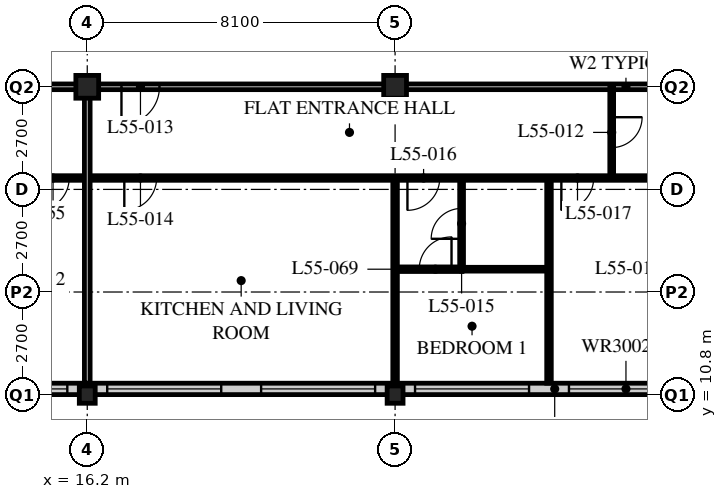
"""IFC4 building model, lengths in metres.
Left out: names, types, materials, properties, quantities, classifications, styles, units other than length and angle.
Written with IfcOpenShell. Run it as: python <this file> out.ifc"""

import sys

from ifc_helpers import new_model, si_unit, direction, frame, frame_2d, origin, origin_2d, place, context, subcontext, project, spatial, rectangle, hollow_rectangle, i_section, extrude, element, fill, save


model = new_model("IFC4")
c1 = context("Model", 3, precision=1e-05, world=origin(), true_north=direction((0.0, 1.0)))
c2 = subcontext(c1, "Body", "Model", "MODEL_VIEW")
j1 = project(units=[si_unit("LENGTHUNIT", "METRE"), si_unit("PLANEANGLEUNIT", "RADIAN")], contexts=[c1])
p1 = place(None, origin())
s1 = spatial("IfcSite", under=j1, at=p1, CompositionType="ELEMENT")
p2 = place(p1, origin())
s2 = spatial("IfcBuilding", under=s1, at=p2, CompositionType="ELEMENT")
p3 = place(p2, frame((0.0, 0.0, 213.6)))
s3 = spatial("IfcBuildingStorey", under=s2, at=p3, CompositionType="ELEMENT", Elevation=213.6)
p4 = place(p3, frame((16.2, 10.8, 0.0), z_axis=(0.0, 0.0, 1.0), x_axis=(1.0, 0.0, 0.0)))
e1 = element("IfcColumn", 1, at=p4, inside=s3, PredefinedType="COLUMN", context=c2, shape_type="SweptSolid", body=[
    extrude(i_section(OverallWidth=0.418, OverallDepth=0.456, WebThickness=0.042, FlangeThickness=0.067, FilletRadius=0.015, at=origin_2d()), origin(), (0.0, 0.0, 1.0), 3.6),
])
p5 = place(p3, frame((16.2, 18.9, 0.0), z_axis=(0.0, 0.0, 1.0), x_axis=(1.0, 0.0, 0.0)))
e2 = element("IfcColumn", 2, at=p5, inside=s3, PredefinedType="COLUMN", context=c2, shape_type="SweptSolid", body=[
    extrude(hollow_rectangle(XDim=0.6, YDim=0.6, WallThickness=0.05, at=origin_2d()), origin(), (0.0, 0.0, 1.0), 3.6),
])
p6 = place(p3, frame((24.3, 10.8, 0.0), z_axis=(0.0, 0.0, 1.0), x_axis=(1.0, 0.0, 0.0)))
e3 = element("IfcColumn", 3, at=p6, inside=s3, PredefinedType="COLUMN", context=c2, shape_type="SweptSolid", body=[
    extrude(i_section(OverallWidth=0.418, OverallDepth=0.456, WebThickness=0.042, FlangeThickness=0.067, FilletRadius=0.015, at=origin_2d()), origin(), (0.0, 0.0, 1.0), 3.6),
])
p7 = place(p3, frame((24.3, 18.9, 0.0), z_axis=(0.0, 0.0, 1.0), x_axis=(1.0, 0.0, 0.0)))
e4 = element("IfcColumn", 4, at=p7, inside=s3, PredefinedType="COLUMN", context=c2, shape_type="SweptSolid", body=[
    extrude(hollow_rectangle(XDim=0.6, YDim=0.6, WallThickness=0.05, at=origin_2d()), origin(), (0.0, 0.0, 1.0), 3.6),
])
p8 = place(p3, frame((8.4, 10.95, 0.0), z_axis=(0.0, 0.0, 1.0), x_axis=(1.0, 0.0, 0.0)))
e5 = element("IfcWall", 5, at=p8, inside=s3, PredefinedType="SOLIDWALL", context=c2, shape_type="SweptSolid", body=[
    extrude(rectangle(XDim=40.2, YDim=0.3, at=frame_2d((20.1, 0.0))), origin(), (0.0, 0.0, 1.0), 3.39),
])
p9 = place(p8, frame((0.225, 0.0, 0.6)))
e6 = element("IfcOpeningElement", 6, at=p9, cuts=e5, PredefinedType="OPENING", context=c2, shape_type="SweptSolid", body=[
    extrude(rectangle(XDim=3.0, YDim=2.4, at=frame_2d((1.5, 1.2))), frame((0.0, 0.16, 0.0), z_axis=(0.0, -1.0, 0.0), x_axis=(1.0, 0.0, 0.0)), (0.0, 0.0, 1.0), 0.32),
])
p10 = place(p8, frame((4.275, 0.0, 0.6)))
e7 = element("IfcOpeningElement", 7, at=p10, cuts=e5, PredefinedType="OPENING", context=c2, shape_type="SweptSolid", body=[
    extrude(rectangle(XDim=3.0, YDim=2.4, at=frame_2d((1.5, 1.2))), frame((0.0, 0.16, 0.0), z_axis=(0.0, -1.0, 0.0), x_axis=(1.0, 0.0, 0.0)), (0.0, 0.0, 1.0), 0.32),
])
p11 = place(p8, frame((8.325, 0.0, 0.6)))
e8 = element("IfcOpeningElement", 8, at=p11, cuts=e5, PredefinedType="OPENING", context=c2, shape_type="SweptSolid", body=[
    extrude(rectangle(XDim=3.0, YDim=2.4, at=frame_2d((1.5, 1.2))), frame((0.0, 0.16, 0.0), z_axis=(0.0, -1.0, 0.0), x_axis=(1.0, 0.0, 0.0)), (0.0, 0.0, 1.0), 0.32),
])
p12 = place(p8, frame((12.375, 0.0, 0.6)))
e9 = element("IfcOpeningElement", 9, at=p12, cuts=e5, PredefinedType="OPENING", context=c2, shape_type="SweptSolid", body=[
    extrude(rectangle(XDim=3.0, YDim=2.4, at=frame_2d((1.5, 1.2))), frame((0.0, 0.16, 0.0), z_axis=(0.0, -1.0, 0.0), x_axis=(1.0, 0.0, 0.0)), (0.0, 0.0, 1.0), 0.32),
])
p13 = place(p8, frame((16.425, 0.0, 0.6)))
e10 = element("IfcOpeningElement", 10, at=p13, cuts=e5, PredefinedType="OPENING", context=c2, shape_type="SweptSolid", body=[
    extrude(rectangle(XDim=3.0, YDim=2.4, at=frame_2d((1.5, 1.2))), frame((0.0, 0.16, 0.0), z_axis=(0.0, -1.0, 0.0), x_axis=(1.0, 0.0, 0.0)), (0.0, 0.0, 1.0), 0.32),
])
p14 = place(p8, frame((20.475, 0.0, 0.6)))
e11 = element("IfcOpeningElement", 11, at=p14, cuts=e5, PredefinedType="OPENING", context=c2, shape_type="SweptSolid", body=[
    extrude(rectangle(XDim=3.0, YDim=2.4, at=frame_2d((1.5, 1.2))), frame((0.0, 0.16, 0.0), z_axis=(0.0, -1.0, 0.0), x_axis=(1.0, 0.0, 0.0)), (0.0, 0.0, 1.0), 0.32),
])
p15 = place(p8, frame((24.525, 0.0, 0.6)))
e12 = element("IfcOpeningElement", 12, at=p15, cuts=e5, PredefinedType="OPENING", context=c2, shape_type="SweptSolid", body=[
    extrude(rectangle(XDim=3.0, YDim=2.4, at=frame_2d((1.5, 1.2))), frame((0.0, 0.16, 0.0), z_axis=(0.0, -1.0, 0.0), x_axis=(1.0, 0.0, 0.0)), (0.0, 0.0, 1.0), 0.32),
])
p16 = place(p8, frame((28.575, 0.0, 0.6)))
e13 = element("IfcOpeningElement", 13, at=p16, cuts=e5, PredefinedType="OPENING", context=c2, shape_type="SweptSolid", body=[
    extrude(rectangle(XDim=3.0, YDim=2.4, at=frame_2d((1.5, 1.2))), frame((0.0, 0.16, 0.0), z_axis=(0.0, -1.0, 0.0), x_axis=(1.0, 0.0, 0.0)), (0.0, 0.0, 1.0), 0.32),
])
p17 = place(p8, frame((32.625, 0.0, 0.6)))
e14 = element("IfcOpeningElement", 14, at=p17, cuts=e5, PredefinedType="OPENING", context=c2, shape_type="SweptSolid", body=[
    extrude(rectangle(XDim=3.0, YDim=2.4, at=frame_2d((1.5, 1.2))), frame((0.0, 0.16, 0.0), z_axis=(0.0, -1.0, 0.0), x_axis=(1.0, 0.0, 0.0)), (0.0, 0.0, 1.0), 0.32),
])
p18 = place(p8, frame((36.675, 0.0, 0.6)))
e15 = element("IfcOpeningElement", 15, at=p18, cuts=e5, PredefinedType="OPENING", context=c2, shape_type="SweptSolid", body=[
    extrude(rectangle(XDim=3.0, YDim=2.4, at=frame_2d((1.5, 1.2))), frame((0.0, 0.16, 0.0), z_axis=(0.0, -1.0, 0.0), x_axis=(1.0, 0.0, 0.0)), (0.0, 0.0, 1.0), 0.32),
])
p19 = place(p3, frame((12.15, 18.9, 0.0), z_axis=(0.0, 0.0, 1.0), x_axis=(1.0, 0.0, 0.0)))
e16 = element("IfcWall", 16, at=p19, inside=s3, PredefinedType="PARTITIONING", context=c2, shape_type="SweptSolid", body=[
    extrude(rectangle(XDim=36.45, YDim=0.15, at=frame_2d((18.225, 0.0))), origin(), (0.0, 0.0, 1.0), 2.778),
])
p20 = place(p19, frame((4.95, 0.0, 0.0)))
e17 = element("IfcOpeningElement", 17, at=p20, cuts=e16, PredefinedType="OPENING", context=c2, shape_type="SweptSolid", body=[
    extrude(rectangle(XDim=1.0, YDim=2.1, at=frame_2d((0.5, 1.05))), frame((0.0, 0.085, 0.0), z_axis=(0.0, -1.0, 0.0), x_axis=(1.0, 0.0, 0.0)), (0.0, 0.0, 1.0), 0.17),
])
p21 = place(p19, frame((22.6, 0.0, 0.0)))
e18 = element("IfcOpeningElement", 18, at=p21, cuts=e16, PredefinedType="OPENING", context=c2, shape_type="SweptSolid", body=[
    extrude(rectangle(XDim=1.0, YDim=2.1, at=frame_2d((0.5, 1.05))), frame((0.0, 0.085, 0.0), z_axis=(0.0, -1.0, 0.0), x_axis=(1.0, 0.0, 0.0)), (0.0, 0.0, 1.0), 0.17),
])
p22 = place(p19, frame((25.0, 0.0, 0.0)))
e19 = element("IfcOpeningElement", 19, at=p22, cuts=e16, PredefinedType="OPENING", context=c2, shape_type="SweptSolid", body=[
    extrude(rectangle(XDim=1.0, YDim=2.1, at=frame_2d((0.5, 1.05))), frame((0.0, 0.085, 0.0), z_axis=(0.0, -1.0, 0.0), x_axis=(1.0, 0.0, 0.0)), (0.0, 0.0, 1.0), 0.17),
])
p23 = place(p19, frame((30.7, 0.0, 0.0)))
e20 = element("IfcOpeningElement", 20, at=p23, cuts=e16, PredefinedType="OPENING", context=c2, shape_type="SweptSolid", body=[
    extrude(rectangle(XDim=1.0, YDim=2.1, at=frame_2d((0.5, 1.05))), frame((0.0, 0.085, 0.0), z_axis=(0.0, -1.0, 0.0), x_axis=(1.0, 0.0, 0.0)), (0.0, 0.0, 1.0), 0.17),
])
p24 = place(p19, frame((1.525, 0.0, 0.0)))
e21 = element("IfcOpeningElement", 21, at=p24, cuts=e16, PredefinedType="OPENING", context=c2, shape_type="SweptSolid", body=[
    extrude(rectangle(XDim=1.0, YDim=2.1, at=frame_2d((0.5, 1.05))), frame((0.0, 0.085, 0.0), z_axis=(0.0, -1.0, 0.0), x_axis=(1.0, 0.0, 0.0)), (0.0, 0.0, 1.0), 0.17),
])
p25 = place(p19, frame((32.825, 0.0, 0.0)))
e22 = element("IfcOpeningElement", 22, at=p25, cuts=e16, PredefinedType="OPENING", context=c2, shape_type="SweptSolid", body=[
    extrude(rectangle(XDim=1.0, YDim=2.1, at=frame_2d((0.5, 1.05))), frame((0.0, 0.085, 0.0), z_axis=(0.0, -1.0, 0.0), x_axis=(1.0, 0.0, 0.0)), (0.0, 0.0, 1.0), 0.17),
])
p26 = place(p3, frame((30.0, 18.9, 0.0), z_axis=(0.0, 0.0, 1.0), x_axis=(0.0, -1.0, 0.0)))
e23 = element("IfcWall", 23, at=p26, inside=s3, PredefinedType="PARTITIONING", context=c2, shape_type="SweptSolid", body=[
    extrude(rectangle(XDim=2.4, YDim=0.1, at=frame_2d((1.2, 0.0))), origin(), (0.0, 0.0, 1.0), 3.39),
])
p27 = place(p26, frame((0.8, 0.0, 0.0)))
e24 = element("IfcOpeningElement", 24, at=p27, cuts=e23, PredefinedType="OPENING", context=c2, shape_type="SweptSolid", body=[
    extrude(rectangle(XDim=0.8, YDim=2.1, at=frame_2d((0.4, 1.05))), frame((0.0, 0.06, 0.0), z_axis=(0.0, -1.0, 0.0), x_axis=(1.0, 0.0, 0.0)), (0.0, 0.0, 1.0), 0.12),
])
p28 = place(p3, frame((26.05, 16.5, 0.0), z_axis=(0.0, 0.0, 1.0), x_axis=(0.0, -1.0, 0.0)))
e25 = element("IfcWall", 25, at=p28, inside=s3, PredefinedType="PARTITIONING", context=c2, shape_type="SweptSolid", body=[
    extrude(rectangle(XDim=2.4, YDim=0.1, at=frame_2d((1.2, 0.0))), origin(), (0.0, 0.0, 1.0), 3.39),
])
p29 = place(p28, frame((0.8, 0.0, 0.0)))
e26 = element("IfcOpeningElement", 26, at=p29, cuts=e25, PredefinedType="OPENING", context=c2, shape_type="SweptSolid", body=[
    extrude(rectangle(XDim=0.8, YDim=2.1, at=frame_2d((0.4, 1.05))), frame((0.0, 0.06, 0.0), z_axis=(0.0, -1.0, 0.0), x_axis=(1.0, 0.0, 0.0)), (0.0, 0.0, 1.0), 0.12),
])
p30 = place(p3, frame((26.05, 14.1, 0.0), z_axis=(0.0, 0.0, 1.0), x_axis=(1.0, 0.0, 0.0)))
e27 = element("IfcWall", 27, at=p30, inside=s3, PredefinedType="PARTITIONING", context=c2, shape_type="SweptSolid", body=[
    extrude(rectangle(XDim=2.3, YDim=0.1, at=frame_2d((1.15, 0.0))), origin(), (0.0, 0.0, 1.0), 3.39),
])
p31 = place(p3, frame((24.3, 16.5, 0.0), z_axis=(0.0, 0.0, 1.0), x_axis=(0.0, -1.0, 0.0)))
e28 = element("IfcWall", 28, at=p31, inside=s3, PredefinedType="PARTITIONING", context=c2, shape_type="SweptSolid", body=[
    extrude(rectangle(XDim=5.4, YDim=0.12, at=frame_2d((2.7, 0.0))), origin(), (0.0, 0.0, 1.0), 2.778),
])
p32 = place(p3, frame((28.35, 16.5, 0.0), z_axis=(0.0, 0.0, 1.0), x_axis=(0.0, -1.0, 0.0)))
e29 = element("IfcWall", 29, at=p32, inside=s3, PredefinedType="PARTITIONING", context=c2, shape_type="SweptSolid", body=[
    extrude(rectangle(XDim=5.4, YDim=0.12, at=frame_2d((2.7, 0.0))), origin(), (0.0, 0.0, 1.0), 3.39),
])
p33 = place(p3, frame((8.15, 16.5, 0.0), z_axis=(0.0, 0.0, 1.0), x_axis=(1.0, 0.0, 0.0)))
e30 = element("IfcWall", 30, at=p33, inside=s3, PredefinedType="PARTITIONING", context=c2, shape_type="SweptSolid", body=[
    extrude(rectangle(XDim=24.25, YDim=0.12, at=frame_2d((12.125, 0.0))), origin(), (0.0, 0.0, 1.0), 3.39),
])
p34 = place(p33, frame((9.025, 0.0, 0.0)))
e31 = element("IfcOpeningElement", 31, at=p34, cuts=e30, PredefinedType="OPENING", context=c2, shape_type="SweptSolid", body=[
    extrude(rectangle(XDim=0.85, YDim=2.1, at=frame_2d((0.425, 1.05))), frame((0.0, 0.07, 0.0), z_axis=(0.0, -1.0, 0.0), x_axis=(1.0, 0.0, 0.0)), (0.0, 0.0, 1.0), 0.14),
])
p35 = place(p33, frame((16.475, 0.0, 0.0)))
e32 = element("IfcOpeningElement", 32, at=p35, cuts=e30, PredefinedType="OPENING", context=c2, shape_type="SweptSolid", body=[
    extrude(rectangle(XDim=0.85, YDim=2.1, at=frame_2d((0.425, 1.05))), frame((0.0, 0.07, 0.0), z_axis=(0.0, -1.0, 0.0), x_axis=(1.0, 0.0, 0.0)), (0.0, 0.0, 1.0), 0.14),
])
p36 = place(p33, frame((20.525, 0.0, 0.0)))
e33 = element("IfcOpeningElement", 33, at=p36, cuts=e30, PredefinedType="OPENING", context=c2, shape_type="SweptSolid", body=[
    extrude(rectangle(XDim=0.85, YDim=2.1, at=frame_2d((0.425, 1.05))), frame((0.0, 0.07, 0.0), z_axis=(0.0, -1.0, 0.0), x_axis=(1.0, 0.0, 0.0)), (0.0, 0.0, 1.0), 0.14),
])
p37 = place(p33, frame((6.725, 0.0, 0.0)))
e34 = element("IfcOpeningElement", 34, at=p37, cuts=e30, PredefinedType="OPENING", context=c2, shape_type="SweptSolid", body=[
    extrude(rectangle(XDim=0.85, YDim=2.1, at=frame_2d((0.425, 1.05))), frame((0.0, 0.07, 0.0), z_axis=(0.0, -1.0, 0.0), x_axis=(1.0, 0.0, 0.0)), (0.0, 0.0, 1.0), 0.14),
])
p38 = place(p33, frame((2.875, 0.0, 0.0)))
e35 = element("IfcOpeningElement", 35, at=p38, cuts=e30, PredefinedType="OPENING", context=c2, shape_type="SweptSolid", body=[
    extrude(rectangle(XDim=0.85, YDim=2.1, at=frame_2d((0.425, 1.05))), frame((0.0, 0.07, 0.0), z_axis=(0.0, -1.0, 0.0), x_axis=(1.0, 0.0, 0.0)), (0.0, 0.0, 1.0), 0.14),
])
p39 = place(p3, frame((16.2, 18.9, 0.0), z_axis=(0.0, 0.0, 1.0), x_axis=(0.0, -1.0, 0.0)))
e36 = element("IfcWall", 36, at=p39, inside=s3, PredefinedType="PARTITIONING", context=c2, shape_type="SweptSolid", body=[
    extrude(rectangle(XDim=7.8, YDim=0.15, at=frame_2d((3.9, 0.0))), origin(), (0.0, 0.0, 1.0), 2.778),
])
p40 = place(p3, frame((26.06, 14.1, 0.0), z_axis=(0.0, 0.0, 1.0), x_axis=(-1.0, 0.0, 0.0)))
e37 = element("IfcWall", 37, at=p40, inside=s3, PredefinedType="PARTITIONING", context=c2, shape_type="SweptSolid", body=[
    extrude(rectangle(XDim=1.76, YDim=0.12, at=frame_2d((0.88, 0.0))), origin(), (0.0, 0.0, 1.0), 3.39),
])
p41 = place(p40, frame((0.275, 0.0, 0.0)))
e38 = element("IfcOpeningElement", 38, at=p41, cuts=e37, PredefinedType="OPENING", context=c2, shape_type="SweptSolid", body=[
    extrude(rectangle(XDim=0.85, YDim=2.1, at=frame_2d((0.425, 1.05))), frame((0.0, 0.07, 0.0), z_axis=(0.0, -1.0, 0.0), x_axis=(1.0, 0.0, 0.0)), (0.0, 0.0, 1.0), 0.14),
])
p42 = place(p10, origin())
e39 = element("IfcWindow", 39, at=p42, inside=s3, PartitioningType="SINGLE_PANEL", PredefinedType="WINDOW", context=c2, shape_type="SweptSolid", body=[
    extrude(rectangle(XDim=3.0, YDim=2.4, at=frame_2d((1.5, 1.2))), frame((0.0, 0.03, 0.0), z_axis=(0.0, -1.0, 0.0), x_axis=(1.0, 0.0, 0.0)), (0.0, 0.0, 1.0), 0.06),
])
fill(e7, e39)
p43 = place(p11, origin())
e40 = element("IfcWindow", 40, at=p43, inside=s3, PartitioningType="SINGLE_PANEL", PredefinedType="WINDOW", context=c2, shape_type="SweptSolid", body=[
    extrude(rectangle(XDim=3.0, YDim=2.4, at=frame_2d((1.5, 1.2))), frame((0.0, 0.03, 0.0), z_axis=(0.0, -1.0, 0.0), x_axis=(1.0, 0.0, 0.0)), (0.0, 0.0, 1.0), 0.06),
])
fill(e8, e40)
p44 = place(p12, origin())
e41 = element("IfcWindow", 41, at=p44, inside=s3, PartitioningType="SINGLE_PANEL", PredefinedType="WINDOW", context=c2, shape_type="SweptSolid", body=[
    extrude(rectangle(XDim=3.0, YDim=2.4, at=frame_2d((1.5, 1.2))), frame((0.0, 0.03, 0.0), z_axis=(0.0, -1.0, 0.0), x_axis=(1.0, 0.0, 0.0)), (0.0, 0.0, 1.0), 0.06),
])
fill(e9, e41)
p45 = place(p13, origin())
e42 = element("IfcWindow", 42, at=p45, inside=s3, PartitioningType="SINGLE_PANEL", PredefinedType="WINDOW", context=c2, shape_type="SweptSolid", body=[
    extrude(rectangle(XDim=3.0, YDim=2.4, at=frame_2d((1.5, 1.2))), frame((0.0, 0.03, 0.0), z_axis=(0.0, -1.0, 0.0), x_axis=(1.0, 0.0, 0.0)), (0.0, 0.0, 1.0), 0.06),
])
fill(e10, e42)
p46 = place(p14, origin())
e43 = element("IfcWindow", 43, at=p46, inside=s3, PartitioningType="SINGLE_PANEL", PredefinedType="WINDOW", context=c2, shape_type="SweptSolid", body=[
    extrude(rectangle(XDim=3.0, YDim=2.4, at=frame_2d((1.5, 1.2))), frame((0.0, 0.03, 0.0), z_axis=(0.0, -1.0, 0.0), x_axis=(1.0, 0.0, 0.0)), (0.0, 0.0, 1.0), 0.06),
])
fill(e11, e43)
p47 = place(p27, origin())
e44 = element("IfcDoor", 44, at=p47, inside=s3, OperationType="SINGLE_SWING_LEFT", PredefinedType="DOOR", context=c2, shape_type="SweptSolid", body=[
    extrude(rectangle(XDim=0.8, YDim=2.1, at=frame_2d((0.4, 1.05))), frame((0.0, 0.025, 0.0), z_axis=(0.0, -1.0, 0.0), x_axis=(1.0, 0.0, 0.0)), (0.0, 0.0, 1.0), 0.05),
])
fill(e24, e44)
p48 = place(p20, origin())
e45 = element("IfcDoor", 45, at=p48, inside=s3, OperationType="SINGLE_SWING_RIGHT", PredefinedType="DOOR", context=c2, shape_type="SweptSolid", body=[
    extrude(rectangle(XDim=1.0, YDim=2.1, at=frame_2d((0.5, 1.05))), frame((0.0, 0.025, 0.0), z_axis=(0.0, -1.0, 0.0), x_axis=(1.0, 0.0, 0.0)), (0.0, 0.0, 1.0), 0.05),
])
fill(e17, e45)
p49 = place(p34, origin())
e46 = element("IfcDoor", 46, at=p49, inside=s3, OperationType="SINGLE_SWING_RIGHT", PredefinedType="DOOR", context=c2, shape_type="SweptSolid", body=[
    extrude(rectangle(XDim=0.85, YDim=2.1, at=frame_2d((0.425, 1.05))), frame((0.0, 0.025, 0.0), z_axis=(0.0, -1.0, 0.0), x_axis=(1.0, 0.0, 0.0)), (0.0, 0.0, 1.0), 0.05),
])
fill(e31, e46)
p50 = place(p29, origin())
e47 = element("IfcDoor", 47, at=p50, inside=s3, OperationType="SINGLE_SWING_LEFT", PredefinedType="DOOR", context=c2, shape_type="SweptSolid", body=[
    extrude(rectangle(XDim=0.8, YDim=2.1, at=frame_2d((0.4, 1.05))), frame((0.0, 0.025, 0.0), z_axis=(0.0, -1.0, 0.0), x_axis=(1.0, 0.0, 0.0)), (0.0, 0.0, 1.0), 0.05),
])
fill(e26, e47)
p51 = place(p35, origin())
e48 = element("IfcDoor", 48, at=p51, inside=s3, OperationType="SINGLE_SWING_RIGHT", PredefinedType="DOOR", context=c2, shape_type="SweptSolid", body=[
    extrude(rectangle(XDim=0.85, YDim=2.1, at=frame_2d((0.425, 1.05))), frame((0.0, 0.025, 0.0), z_axis=(0.0, -1.0, 0.0), x_axis=(1.0, 0.0, 0.0)), (0.0, 0.0, 1.0), 0.05),
])
fill(e32, e48)
p52 = place(p36, origin())
e49 = element("IfcDoor", 49, at=p52, inside=s3, OperationType="SINGLE_SWING_RIGHT", PredefinedType="DOOR", context=c2, shape_type="SweptSolid", body=[
    extrude(rectangle(XDim=0.85, YDim=2.1, at=frame_2d((0.425, 1.05))), frame((0.0, 0.025, 0.0), z_axis=(0.0, -1.0, 0.0), x_axis=(1.0, 0.0, 0.0)), (0.0, 0.0, 1.0), 0.05),
])
fill(e33, e49)
p53 = place(p37, origin())
e50 = element("IfcDoor", 50, at=p53, inside=s3, OperationType="SINGLE_SWING_RIGHT", PredefinedType="DOOR", context=c2, shape_type="SweptSolid", body=[
    extrude(rectangle(XDim=0.85, YDim=2.1, at=frame_2d((0.425, 1.05))), frame((0.0, 0.025, 0.0), z_axis=(0.0, -1.0, 0.0), x_axis=(1.0, 0.0, 0.0)), (0.0, 0.0, 1.0), 0.05),
])
fill(e34, e50)
p54 = place(p41, origin())
e51 = element("IfcDoor", 51, at=p54, inside=s3, OperationType="SINGLE_SWING_RIGHT", PredefinedType="DOOR", context=c2, shape_type="SweptSolid", body=[
    extrude(rectangle(XDim=0.85, YDim=2.1, at=frame_2d((0.425, 1.05))), frame((0.0, 0.025, 0.0), z_axis=(0.0, -1.0, 0.0), x_axis=(1.0, 0.0, 0.0)), (0.0, 0.0, 1.0), 0.05),
])
fill(e38, e51)
save(model, sys.argv[1])
